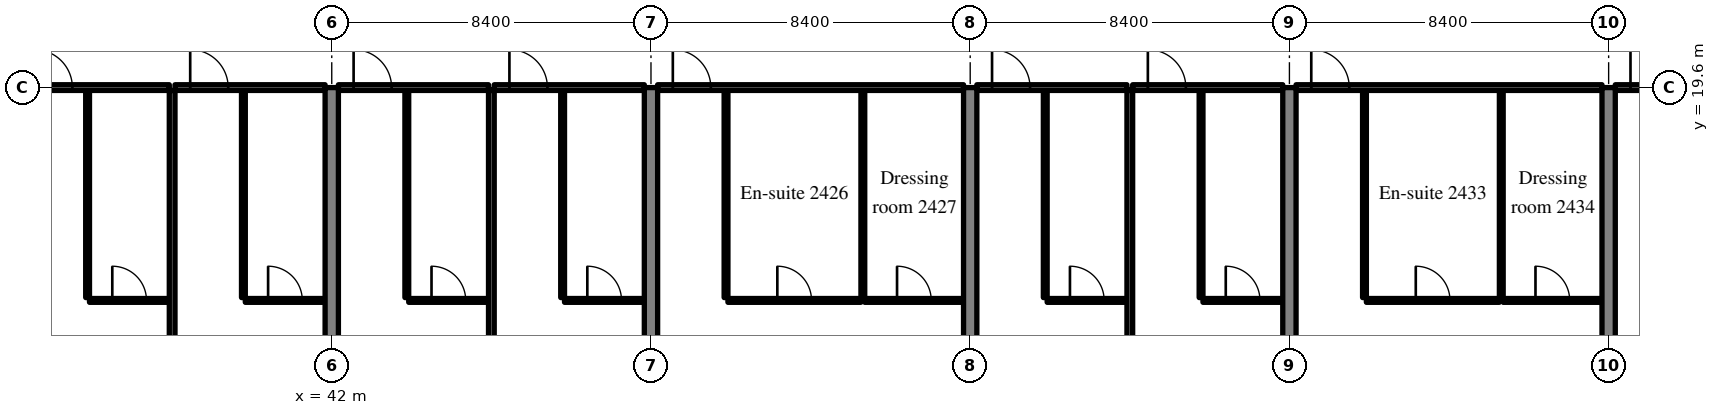
"""IFC4 building model, lengths in metres.
Left out: names, types, materials, properties, quantities, classifications, styles, units other than length and angle.
Written with IfcOpenShell. Run it as: python <this file> out.ifc"""

import sys

from ifc_helpers import new_model, si_unit, direction, frame, frame_2d, origin, place, context, subcontext, project, spatial, rectangle, extrude, source, transform, mapped, element, fill, save


model = new_model("IFC4")
c1 = context("Model", 3, precision=1e-05, world=origin(), true_north=direction((0.0, 1.0)))
c2 = subcontext(c1, "Body", "Model", "MODEL_VIEW")
j1 = project(units=[si_unit("LENGTHUNIT", "METRE"), si_unit("PLANEANGLEUNIT", "RADIAN")], contexts=[c1])
p1 = place(None, origin())
s1 = spatial("IfcSite", under=j1, at=p1, CompositionType="ELEMENT")
p2 = place(p1, origin())
s2 = spatial("IfcBuilding", under=s1, at=p2, CompositionType="ELEMENT")
p3 = place(p2, frame((0.0, 0.0, 102.8)))
s3 = spatial("IfcBuildingStorey", under=s2, at=p3, CompositionType="ELEMENT", Elevation=102.8)
m1 = source(origin(), c2, "Body", "SweptSolid", [
    extrude(rectangle(XDim=14.1, YDim=0.35, at=frame_2d((7.05, 0.0))), origin(), (0.0, 0.0, 1.0), 3.52),
])
p4 = place(p3, frame((42.0, 5.5, 0.0), z_axis=(0.0, 0.0, 1.0), x_axis=(0.0, 1.0, 0.0)))
e1 = element("IfcWall", 1, at=p4, inside=s3, PredefinedType="SHEAR", context=c2, shape_type="MappedRepresentation", body=[
    mapped(m1, transform((0.0, 0.0, 0.0), scale=1.0)),
])
m2 = source(origin(), c2, "Body", "SweptSolid", [
    extrude(rectangle(XDim=13.1, YDim=0.35, at=frame_2d((6.55, 0.0))), origin(), (0.0, 0.0, 1.0), 3.52),
])
p5 = place(p3, frame((50.4, 6.5, 0.0), z_axis=(0.0, 0.0, 1.0), x_axis=(0.0, 1.0, 0.0)))
e2 = element("IfcWall", 2, at=p5, inside=s3, PredefinedType="SHEAR", context=c2, shape_type="MappedRepresentation", body=[
    mapped(m2, transform((0.0, 0.0, 0.0), scale=1.0)),
])
for number, where, z_axis, x_axis in (
    (3, (58.8, 5.5, 0.0), (0.0, 0.0, 1.0), (0.0, 1.0, 0.0)),
    (4, (67.2, 5.5, 0.0), (0.0, 0.0, 1.0), (0.0, 1.0, 0.0)),
    (5, (75.6, 5.5, 0.0), (0.0, 0.0, 1.0), (0.0, 1.0, 0.0)),
):
    element("IfcWall", number, at=place(p3, frame(where, z_axis=z_axis, x_axis=x_axis)), inside=s3, PredefinedType="SHEAR", context=c2, shape_type="MappedRepresentation", body=[
        mapped(m1, transform((0.0, 0.0, 0.0), scale=1.0)),
    ])
m3 = source(origin(), c2, "Body", "SweptSolid", [
    extrude(rectangle(XDim=5.45, YDim=0.1, at=frame_2d((2.725, 0.0))), origin(), (0.0, 0.0, 1.0), 3.52),
])
p6 = place(p3, frame((35.575, 14.075, 0.0), z_axis=(0.0, 0.0, 1.0), x_axis=(0.0, 1.0, 0.0)))
e6 = element("IfcWall", 6, at=p6, inside=s3, PredefinedType="PARTITIONING", context=c2, shape_type="MappedRepresentation", body=[
    mapped(m3, transform((0.0, 0.0, 0.0), scale=1.0)),
])
m4 = source(origin(), c2, "Body", "SweptSolid", [
    extrude(rectangle(XDim=2.1, YDim=0.1, at=frame_2d((1.05, 0.0))), origin(), (0.0, 0.0, 1.0), 3.52),
])
p7 = place(p3, frame((35.625, 14.0, 0.0), z_axis=(0.0, 0.0, 1.0), x_axis=(1.0, 0.0, 0.0)))
e7 = element("IfcWall", 7, at=p7, inside=s3, PredefinedType="PARTITIONING", context=c2, shape_type="MappedRepresentation", body=[
    mapped(m4, transform((0.0, 0.0, 0.0), scale=1.0)),
])
m5 = source(origin(), c2, "Body", "SweptSolid", [
    extrude(rectangle(XDim=0.9, YDim=2.1, at=frame_2d((0.45, 1.05))), frame((0.0, 0.06, 0.0), z_axis=(0.0, -1.0, 0.0), x_axis=(1.0, 0.0, 0.0)), (0.0, 0.0, 1.0), 0.12),
])
p8 = place(p7, frame((0.6, 0.0, 0.0)))
e8 = element("IfcOpeningElement", 8, at=p8, cuts=e7, PredefinedType="OPENING", context=c2, shape_type="MappedRepresentation", body=[
    mapped(m5, transform((0.0, 0.0, 0.0), scale=1.0)),
])
m6 = source(origin(), c2, "Body", "SweptSolid", [
    extrude(rectangle(XDim=3.95, YDim=0.15, at=frame_2d((1.975, 0.0))), origin(), (0.0, 0.0, 1.0), 2.82),
])
p9 = place(p3, frame((33.775, 19.6, 0.0), z_axis=(0.0, 0.0, 1.0), x_axis=(1.0, 0.0, 0.0)))
e9 = element("IfcWall", 9, at=p9, inside=s3, PredefinedType="PARTITIONING", context=c2, shape_type="MappedRepresentation", body=[
    mapped(m6, transform((0.0, 0.0, 0.0), scale=1.0)),
])
m7 = source(origin(), c2, "Body", "SweptSolid", [
    extrude(rectangle(XDim=1.0, YDim=2.1, at=frame_2d((0.5, 1.05))), frame((0.0, 0.085, 0.0), z_axis=(0.0, -1.0, 0.0), x_axis=(1.0, 0.0, 0.0)), (0.0, 0.0, 1.0), 0.17),
])
p10 = place(p9, frame((0.4, 0.0, 0.0)))
e10 = element("IfcOpeningElement", 10, at=p10, cuts=e9, PredefinedType="OPENING", context=c2, shape_type="MappedRepresentation", body=[
    mapped(m7, transform((0.0, 0.0, 0.0), scale=1.0)),
])
p11 = place(p3, frame((39.675, 14.075, 0.0), z_axis=(0.0, 0.0, 1.0), x_axis=(0.0, 1.0, 0.0)))
e11 = element("IfcWall", 11, at=p11, inside=s3, PredefinedType="PARTITIONING", context=c2, shape_type="MappedRepresentation", body=[
    mapped(m3, transform((0.0, 0.0, 0.0), scale=1.0)),
])
m8 = source(origin(), c2, "Body", "SweptSolid", [
    extrude(rectangle(XDim=2.1, YDim=0.1, at=frame_2d((1.05, 0.0))), origin(), (0.0, 0.0, 1.0), 3.52),
])
p12 = place(p3, frame((39.725, 14.0, 0.0), z_axis=(0.0, 0.0, 1.0), x_axis=(1.0, 0.0, 0.0)))
e12 = element("IfcWall", 12, at=p12, inside=s3, PredefinedType="PARTITIONING", context=c2, shape_type="MappedRepresentation", body=[
    mapped(m8, transform((0.0, 0.0, 0.0), scale=1.0)),
])
p13 = place(p12, frame((0.6, 0.0, 0.0)))
e13 = element("IfcOpeningElement", 13, at=p13, cuts=e12, PredefinedType="OPENING", context=c2, shape_type="MappedRepresentation", body=[
    mapped(m5, transform((0.0, 0.0, 0.0), scale=1.0)),
])
m9 = source(origin(), c2, "Body", "SweptSolid", [
    extrude(rectangle(XDim=3.95, YDim=0.15, at=frame_2d((1.975, 0.0))), origin(), (0.0, 0.0, 1.0), 2.82),
])
p14 = place(p3, frame((37.875, 19.6, 0.0), z_axis=(0.0, 0.0, 1.0), x_axis=(1.0, 0.0, 0.0)))
e14 = element("IfcWall", 14, at=p14, inside=s3, PredefinedType="PARTITIONING", context=c2, shape_type="MappedRepresentation", body=[
    mapped(m9, transform((0.0, 0.0, 0.0), scale=1.0)),
])
p15 = place(p14, frame((0.4, 0.0, 0.0)))
e15 = element("IfcOpeningElement", 15, at=p15, cuts=e14, PredefinedType="OPENING", context=c2, shape_type="MappedRepresentation", body=[
    mapped(m7, transform((0.0, 0.0, 0.0), scale=1.0)),
])
m10 = source(origin(), c2, "Body", "SweptSolid", [
    extrude(rectangle(XDim=15.498, YDim=0.15, at=frame_2d((7.749, 0.0))), origin(), (0.0, 0.0, 1.0), 3.52),
])
p16 = place(p3, frame((37.8, 4.027, 0.0), z_axis=(0.0, 0.0, 1.0), x_axis=(0.0, 1.0, 0.0)))
e16 = element("IfcWall", 16, at=p16, inside=s3, PredefinedType="PARTITIONING", context=c2, shape_type="MappedRepresentation", body=[
    mapped(m10, transform((0.0, 0.0, 0.0), scale=1.0)),
])
p17 = place(p3, frame((43.975, 14.075, 0.0), z_axis=(0.0, 0.0, 1.0), x_axis=(0.0, 1.0, 0.0)))
e17 = element("IfcWall", 17, at=p17, inside=s3, PredefinedType="PARTITIONING", context=c2, shape_type="MappedRepresentation", body=[
    mapped(m3, transform((0.0, 0.0, 0.0), scale=1.0)),
])
p18 = place(p3, frame((44.025, 14.0, 0.0), z_axis=(0.0, 0.0, 1.0), x_axis=(1.0, 0.0, 0.0)))
e18 = element("IfcWall", 18, at=p18, inside=s3, PredefinedType="PARTITIONING", context=c2, shape_type="MappedRepresentation", body=[
    mapped(m4, transform((0.0, 0.0, 0.0), scale=1.0)),
])
p19 = place(p18, frame((0.6, 0.0, 0.0)))
e19 = element("IfcOpeningElement", 19, at=p19, cuts=e18, PredefinedType="OPENING", context=c2, shape_type="MappedRepresentation", body=[
    mapped(m5, transform((0.0, 0.0, 0.0), scale=1.0)),
])
p20 = place(p3, frame((42.175, 19.6, 0.0), z_axis=(0.0, 0.0, 1.0), x_axis=(1.0, 0.0, 0.0)))
e20 = element("IfcWall", 20, at=p20, inside=s3, PredefinedType="PARTITIONING", context=c2, shape_type="MappedRepresentation", body=[
    mapped(m9, transform((0.0, 0.0, 0.0), scale=1.0)),
])
p21 = place(p20, frame((0.4, 0.0, 0.0)))
e21 = element("IfcOpeningElement", 21, at=p21, cuts=e20, PredefinedType="OPENING", context=c2, shape_type="MappedRepresentation", body=[
    mapped(m7, transform((0.0, 0.0, 0.0), scale=1.0)),
])
p22 = place(p3, frame((48.075, 14.075, 0.0), z_axis=(0.0, 0.0, 1.0), x_axis=(0.0, 1.0, 0.0)))
e22 = element("IfcWall", 22, at=p22, inside=s3, PredefinedType="PARTITIONING", context=c2, shape_type="MappedRepresentation", body=[
    mapped(m3, transform((0.0, 0.0, 0.0), scale=1.0)),
])
p23 = place(p3, frame((48.125, 14.0, 0.0), z_axis=(0.0, 0.0, 1.0), x_axis=(1.0, 0.0, 0.0)))
e23 = element("IfcWall", 23, at=p23, inside=s3, PredefinedType="PARTITIONING", context=c2, shape_type="MappedRepresentation", body=[
    mapped(m4, transform((0.0, 0.0, 0.0), scale=1.0)),
])
p24 = place(p23, frame((0.6, 0.0, 0.0)))
e24 = element("IfcOpeningElement", 24, at=p24, cuts=e23, PredefinedType="OPENING", context=c2, shape_type="MappedRepresentation", body=[
    mapped(m5, transform((0.0, 0.0, 0.0), scale=1.0)),
])
p25 = place(p3, frame((46.275, 19.6, 0.0), z_axis=(0.0, 0.0, 1.0), x_axis=(1.0, 0.0, 0.0)))
e25 = element("IfcWall", 25, at=p25, inside=s3, PredefinedType="PARTITIONING", context=c2, shape_type="MappedRepresentation", body=[
    mapped(m6, transform((0.0, 0.0, 0.0), scale=1.0)),
])
p26 = place(p25, frame((0.4, 0.0, 0.0)))
e26 = element("IfcOpeningElement", 26, at=p26, cuts=e25, PredefinedType="OPENING", context=c2, shape_type="MappedRepresentation", body=[
    mapped(m7, transform((0.0, 0.0, 0.0), scale=1.0)),
])
m11 = source(origin(), c2, "Body", "SweptSolid", [
    extrude(rectangle(XDim=14.906, YDim=0.15, at=frame_2d((7.453, 0.0))), origin(), (0.0, 0.0, 1.0), 3.52),
])
p27 = place(p3, frame((46.2, 4.619, 0.0), z_axis=(0.0, 0.0, 1.0), x_axis=(0.0, 1.0, 0.0)))
e27 = element("IfcWall", 27, at=p27, inside=s3, PredefinedType="PARTITIONING", context=c2, shape_type="MappedRepresentation", body=[
    mapped(m11, transform((0.0, 0.0, 0.0), scale=1.0)),
])
for number, where, z_axis, x_axis in (
    (28, (52.375, 14.075, 0.0), (0.0, 0.0, 1.0), (0.0, 1.0, 0.0)),
    (29, (55.975, 14.075, 0.0), (0.0, 0.0, 1.0), (0.0, 1.0, 0.0)),
):
    element("IfcWall", number, at=place(p3, frame(where, z_axis=z_axis, x_axis=x_axis)), inside=s3, PredefinedType="PARTITIONING", context=c2, shape_type="MappedRepresentation", body=[
        mapped(m3, transform((0.0, 0.0, 0.0), scale=1.0)),
    ])
m12 = source(origin(), c2, "Body", "SweptSolid", [
    extrude(rectangle(XDim=3.5, YDim=0.1, at=frame_2d((1.75, 0.0))), origin(), (0.0, 0.0, 1.0), 3.52),
])
p28 = place(p3, frame((52.425, 14.0, 0.0), z_axis=(0.0, 0.0, 1.0), x_axis=(1.0, 0.0, 0.0)))
e30 = element("IfcWall", 30, at=p28, inside=s3, PredefinedType="PARTITIONING", context=c2, shape_type="MappedRepresentation", body=[
    mapped(m12, transform((0.0, 0.0, 0.0), scale=1.0)),
])
p29 = place(p28, frame((1.3, 0.0, 0.0)))
e31 = element("IfcOpeningElement", 31, at=p29, cuts=e30, PredefinedType="OPENING", context=c2, shape_type="MappedRepresentation", body=[
    mapped(m5, transform((0.0, 0.0, 0.0), scale=1.0)),
])
m13 = source(origin(), c2, "Body", "SweptSolid", [
    extrude(rectangle(XDim=2.6, YDim=0.1, at=frame_2d((1.3, 0.0))), origin(), (0.0, 0.0, 1.0), 3.52),
])
p30 = place(p3, frame((56.025, 14.0, 0.0), z_axis=(0.0, 0.0, 1.0), x_axis=(1.0, 0.0, 0.0)))
e32 = element("IfcWall", 32, at=p30, inside=s3, PredefinedType="PARTITIONING", context=c2, shape_type="MappedRepresentation", body=[
    mapped(m13, transform((0.0, 0.0, 0.0), scale=1.0)),
])
p31 = place(p30, frame((0.85, 0.0, 0.0)))
e33 = element("IfcOpeningElement", 33, at=p31, cuts=e32, PredefinedType="OPENING", context=c2, shape_type="MappedRepresentation", body=[
    mapped(m5, transform((0.0, 0.0, 0.0), scale=1.0)),
])
m14 = source(origin(), c2, "Body", "SweptSolid", [
    extrude(rectangle(XDim=8.05, YDim=0.15, at=frame_2d((4.025, 0.0))), origin(), (0.0, 0.0, 1.0), 2.82),
])
p32 = place(p3, frame((50.575, 19.6, 0.0), z_axis=(0.0, 0.0, 1.0), x_axis=(1.0, 0.0, 0.0)))
e34 = element("IfcWall", 34, at=p32, inside=s3, PredefinedType="PARTITIONING", context=c2, shape_type="MappedRepresentation", body=[
    mapped(m14, transform((0.0, 0.0, 0.0), scale=1.0)),
])
p33 = place(p32, frame((0.4, 0.0, 0.0)))
e35 = element("IfcOpeningElement", 35, at=p33, cuts=e34, PredefinedType="OPENING", context=c2, shape_type="MappedRepresentation", body=[
    mapped(m7, transform((0.0, 0.0, 0.0), scale=1.0)),
])
p34 = place(p3, frame((60.775, 14.075, 0.0), z_axis=(0.0, 0.0, 1.0), x_axis=(0.0, 1.0, 0.0)))
e36 = element("IfcWall", 36, at=p34, inside=s3, PredefinedType="PARTITIONING", context=c2, shape_type="MappedRepresentation", body=[
    mapped(m3, transform((0.0, 0.0, 0.0), scale=1.0)),
])
p35 = place(p3, frame((60.825, 14.0, 0.0), z_axis=(0.0, 0.0, 1.0), x_axis=(1.0, 0.0, 0.0)))
e37 = element("IfcWall", 37, at=p35, inside=s3, PredefinedType="PARTITIONING", context=c2, shape_type="MappedRepresentation", body=[
    mapped(m4, transform((0.0, 0.0, 0.0), scale=1.0)),
])
p36 = place(p35, frame((0.6, 0.0, 0.0)))
e38 = element("IfcOpeningElement", 38, at=p36, cuts=e37, PredefinedType="OPENING", context=c2, shape_type="MappedRepresentation", body=[
    mapped(m5, transform((0.0, 0.0, 0.0), scale=1.0)),
])
p37 = place(p3, frame((58.975, 19.6, 0.0), z_axis=(0.0, 0.0, 1.0), x_axis=(1.0, 0.0, 0.0)))
e39 = element("IfcWall", 39, at=p37, inside=s3, PredefinedType="PARTITIONING", context=c2, shape_type="MappedRepresentation", body=[
    mapped(m9, transform((0.0, 0.0, 0.0), scale=1.0)),
])
p38 = place(p37, frame((0.4, 0.0, 0.0)))
e40 = element("IfcOpeningElement", 40, at=p38, cuts=e39, PredefinedType="OPENING", context=c2, shape_type="MappedRepresentation", body=[
    mapped(m7, transform((0.0, 0.0, 0.0), scale=1.0)),
])
p39 = place(p3, frame((64.875, 14.075, 0.0), z_axis=(0.0, 0.0, 1.0), x_axis=(0.0, 1.0, 0.0)))
e41 = element("IfcWall", 41, at=p39, inside=s3, PredefinedType="PARTITIONING", context=c2, shape_type="MappedRepresentation", body=[
    mapped(m3, transform((0.0, 0.0, 0.0), scale=1.0)),
])
p40 = place(p3, frame((64.925, 14.0, 0.0), z_axis=(0.0, 0.0, 1.0), x_axis=(1.0, 0.0, 0.0)))
e42 = element("IfcWall", 42, at=p40, inside=s3, PredefinedType="PARTITIONING", context=c2, shape_type="MappedRepresentation", body=[
    mapped(m8, transform((0.0, 0.0, 0.0), scale=1.0)),
])
p41 = place(p40, frame((0.6, 0.0, 0.0)))
e43 = element("IfcOpeningElement", 43, at=p41, cuts=e42, PredefinedType="OPENING", context=c2, shape_type="MappedRepresentation", body=[
    mapped(m5, transform((0.0, 0.0, 0.0), scale=1.0)),
])
p42 = place(p3, frame((63.075, 19.6, 0.0), z_axis=(0.0, 0.0, 1.0), x_axis=(1.0, 0.0, 0.0)))
e44 = element("IfcWall", 44, at=p42, inside=s3, PredefinedType="PARTITIONING", context=c2, shape_type="MappedRepresentation", body=[
    mapped(m9, transform((0.0, 0.0, 0.0), scale=1.0)),
])
p43 = place(p42, frame((0.4, 0.0, 0.0)))
e45 = element("IfcOpeningElement", 45, at=p43, cuts=e44, PredefinedType="OPENING", context=c2, shape_type="MappedRepresentation", body=[
    mapped(m7, transform((0.0, 0.0, 0.0), scale=1.0)),
])
p44 = place(p3, frame((63.0, 4.027, 0.0), z_axis=(0.0, 0.0, 1.0), x_axis=(0.0, 1.0, 0.0)))
e46 = element("IfcWall", 46, at=p44, inside=s3, PredefinedType="PARTITIONING", context=c2, shape_type="MappedRepresentation", body=[
    mapped(m10, transform((0.0, 0.0, 0.0), scale=1.0)),
])
for number, where, z_axis, x_axis in (
    (47, (69.175, 14.075, 0.0), (0.0, 0.0, 1.0), (0.0, 1.0, 0.0)),
    (48, (72.775, 14.075, 0.0), (0.0, 0.0, 1.0), (0.0, 1.0, 0.0)),
):
    element("IfcWall", number, at=place(p3, frame(where, z_axis=z_axis, x_axis=x_axis)), inside=s3, PredefinedType="PARTITIONING", context=c2, shape_type="MappedRepresentation", body=[
        mapped(m3, transform((0.0, 0.0, 0.0), scale=1.0)),
    ])
p45 = place(p3, frame((69.225, 14.0, 0.0), z_axis=(0.0, 0.0, 1.0), x_axis=(1.0, 0.0, 0.0)))
e49 = element("IfcWall", 49, at=p45, inside=s3, PredefinedType="PARTITIONING", context=c2, shape_type="MappedRepresentation", body=[
    mapped(m12, transform((0.0, 0.0, 0.0), scale=1.0)),
])
p46 = place(p45, frame((1.3, 0.0, 0.0)))
e50 = element("IfcOpeningElement", 50, at=p46, cuts=e49, PredefinedType="OPENING", context=c2, shape_type="MappedRepresentation", body=[
    mapped(m5, transform((0.0, 0.0, 0.0), scale=1.0)),
])
p47 = place(p3, frame((72.825, 14.0, 0.0), z_axis=(0.0, 0.0, 1.0), x_axis=(1.0, 0.0, 0.0)))
e51 = element("IfcWall", 51, at=p47, inside=s3, PredefinedType="PARTITIONING", context=c2, shape_type="MappedRepresentation", body=[
    mapped(m13, transform((0.0, 0.0, 0.0), scale=1.0)),
])
p48 = place(p47, frame((0.85, 0.0, 0.0)))
e52 = element("IfcOpeningElement", 52, at=p48, cuts=e51, PredefinedType="OPENING", context=c2, shape_type="MappedRepresentation", body=[
    mapped(m5, transform((0.0, 0.0, 0.0), scale=1.0)),
])
p49 = place(p3, frame((67.375, 19.6, 0.0), z_axis=(0.0, 0.0, 1.0), x_axis=(1.0, 0.0, 0.0)))
e53 = element("IfcWall", 53, at=p49, inside=s3, PredefinedType="PARTITIONING", context=c2, shape_type="MappedRepresentation", body=[
    mapped(m14, transform((0.0, 0.0, 0.0), scale=1.0)),
])
p50 = place(p49, frame((0.4, 0.0, 0.0)))
e54 = element("IfcOpeningElement", 54, at=p50, cuts=e53, PredefinedType="OPENING", context=c2, shape_type="MappedRepresentation", body=[
    mapped(m7, transform((0.0, 0.0, 0.0), scale=1.0)),
])
p51 = place(p3, frame((75.775, 19.6, 0.0), z_axis=(0.0, 0.0, 1.0), x_axis=(1.0, 0.0, 0.0)))
e55 = element("IfcWall", 55, at=p51, inside=s3, PredefinedType="PARTITIONING", context=c2, shape_type="MappedRepresentation", body=[
    mapped(m14, transform((0.0, 0.0, 0.0), scale=1.0)),
])
p52 = place(p51, frame((0.4, 0.0, 0.0)))
e56 = element("IfcOpeningElement", 56, at=p52, cuts=e55, PredefinedType="OPENING", context=c2, shape_type="MappedRepresentation", body=[
    mapped(m7, transform((0.0, 0.0, 0.0), scale=1.0)),
])
m15 = source(origin(), c2, "Body", "SweptSolid", [
    extrude(rectangle(XDim=0.9, YDim=2.1, at=frame_2d((0.45, 1.05))), frame((0.0, 0.025, 0.0), z_axis=(0.0, -1.0, 0.0), x_axis=(1.0, 0.0, 0.0)), (0.0, 0.0, 1.0), 0.05),
])
p53 = place(p8, origin())
e57 = element("IfcDoor", 57, at=p53, inside=s3, OperationType="SINGLE_SWING_LEFT", PredefinedType="DOOR", context=c2, shape_type="MappedRepresentation", body=[
    mapped(m15, transform((0.0, 0.0, 0.0), scale=1.0)),
])
fill(e8, e57)
m16 = source(origin(), c2, "Body", "SweptSolid", [
    extrude(rectangle(XDim=1.0, YDim=2.1, at=frame_2d((0.5, 1.05))), frame((0.0, 0.025, 0.0), z_axis=(0.0, -1.0, 0.0), x_axis=(1.0, 0.0, 0.0)), (0.0, 0.0, 1.0), 0.05),
])
p54 = place(p10, origin())
e58 = element("IfcDoor", 58, at=p54, inside=s3, OperationType="SINGLE_SWING_LEFT", PredefinedType="DOOR", context=c2, shape_type="MappedRepresentation", body=[
    mapped(m16, transform((0.0, 0.0, 0.0), scale=1.0)),
])
fill(e10, e58)
p55 = place(p13, origin())
e59 = element("IfcDoor", 59, at=p55, inside=s3, OperationType="SINGLE_SWING_LEFT", PredefinedType="DOOR", context=c2, shape_type="MappedRepresentation", body=[
    mapped(m15, transform((0.0, 0.0, 0.0), scale=1.0)),
])
fill(e13, e59)
p56 = place(p15, origin())
e60 = element("IfcDoor", 60, at=p56, inside=s3, OperationType="SINGLE_SWING_LEFT", PredefinedType="DOOR", context=c2, shape_type="MappedRepresentation", body=[
    mapped(m16, transform((0.0, 0.0, 0.0), scale=1.0)),
])
fill(e15, e60)
p57 = place(p19, origin())
e61 = element("IfcDoor", 61, at=p57, inside=s3, OperationType="SINGLE_SWING_LEFT", PredefinedType="DOOR", context=c2, shape_type="MappedRepresentation", body=[
    mapped(m15, transform((0.0, 0.0, 0.0), scale=1.0)),
])
fill(e19, e61)
p58 = place(p21, origin())
e62 = element("IfcDoor", 62, at=p58, inside=s3, OperationType="SINGLE_SWING_LEFT", PredefinedType="DOOR", context=c2, shape_type="MappedRepresentation", body=[
    mapped(m16, transform((0.0, 0.0, 0.0), scale=1.0)),
])
fill(e21, e62)
p59 = place(p24, origin())
e63 = element("IfcDoor", 63, at=p59, inside=s3, OperationType="SINGLE_SWING_LEFT", PredefinedType="DOOR", context=c2, shape_type="MappedRepresentation", body=[
    mapped(m15, transform((0.0, 0.0, 0.0), scale=1.0)),
])
fill(e24, e63)
p60 = place(p26, origin())
e64 = element("IfcDoor", 64, at=p60, inside=s3, OperationType="SINGLE_SWING_LEFT", PredefinedType="DOOR", context=c2, shape_type="MappedRepresentation", body=[
    mapped(m16, transform((0.0, 0.0, 0.0), scale=1.0)),
])
fill(e26, e64)
p61 = place(p29, origin())
e65 = element("IfcDoor", 65, at=p61, inside=s3, OperationType="SINGLE_SWING_LEFT", PredefinedType="DOOR", context=c2, shape_type="MappedRepresentation", body=[
    mapped(m15, transform((0.0, 0.0, 0.0), scale=1.0)),
])
fill(e31, e65)
p62 = place(p31, origin())
e66 = element("IfcDoor", 66, at=p62, inside=s3, OperationType="SINGLE_SWING_LEFT", PredefinedType="DOOR", context=c2, shape_type="MappedRepresentation", body=[
    mapped(m15, transform((0.0, 0.0, 0.0), scale=1.0)),
])
fill(e33, e66)
p63 = place(p33, origin())
e67 = element("IfcDoor", 67, at=p63, inside=s3, OperationType="SINGLE_SWING_LEFT", PredefinedType="DOOR", context=c2, shape_type="MappedRepresentation", body=[
    mapped(m16, transform((0.0, 0.0, 0.0), scale=1.0)),
])
fill(e35, e67)
p64 = place(p36, origin())
e68 = element("IfcDoor", 68, at=p64, inside=s3, OperationType="SINGLE_SWING_LEFT", PredefinedType="DOOR", context=c2, shape_type="MappedRepresentation", body=[
    mapped(m15, transform((0.0, 0.0, 0.0), scale=1.0)),
])
fill(e38, e68)
p65 = place(p38, origin())
e69 = element("IfcDoor", 69, at=p65, inside=s3, OperationType="SINGLE_SWING_LEFT", PredefinedType="DOOR", context=c2, shape_type="MappedRepresentation", body=[
    mapped(m16, transform((0.0, 0.0, 0.0), scale=1.0)),
])
fill(e40, e69)
p66 = place(p41, origin())
e70 = element("IfcDoor", 70, at=p66, inside=s3, OperationType="SINGLE_SWING_LEFT", PredefinedType="DOOR", context=c2, shape_type="MappedRepresentation", body=[
    mapped(m15, transform((0.0, 0.0, 0.0), scale=1.0)),
])
fill(e43, e70)
p67 = place(p43, origin())
e71 = element("IfcDoor", 71, at=p67, inside=s3, OperationType="SINGLE_SWING_LEFT", PredefinedType="DOOR", context=c2, shape_type="MappedRepresentation", body=[
    mapped(m16, transform((0.0, 0.0, 0.0), scale=1.0)),
])
fill(e45, e71)
p68 = place(p46, origin())
e72 = element("IfcDoor", 72, at=p68, inside=s3, OperationType="SINGLE_SWING_LEFT", PredefinedType="DOOR", context=c2, shape_type="MappedRepresentation", body=[
    mapped(m15, transform((0.0, 0.0, 0.0), scale=1.0)),
])
fill(e50, e72)
p69 = place(p48, origin())
e73 = element("IfcDoor", 73, at=p69, inside=s3, OperationType="SINGLE_SWING_LEFT", PredefinedType="DOOR", context=c2, shape_type="MappedRepresentation", body=[
    mapped(m15, transform((0.0, 0.0, 0.0), scale=1.0)),
])
fill(e52, e73)
p70 = place(p50, origin())
e74 = element("IfcDoor", 74, at=p70, inside=s3, OperationType="SINGLE_SWING_LEFT", PredefinedType="DOOR", context=c2, shape_type="MappedRepresentation", body=[
    mapped(m16, transform((0.0, 0.0, 0.0), scale=1.0)),
])
fill(e54, e74)
p71 = place(p52, origin())
e75 = element("IfcDoor", 75, at=p71, inside=s3, OperationType="SINGLE_SWING_LEFT", PredefinedType="DOOR", context=c2, shape_type="MappedRepresentation", body=[
    mapped(m16, transform((0.0, 0.0, 0.0), scale=1.0)),
])
fill(e56, e75)
save(model, sys.argv[1])
